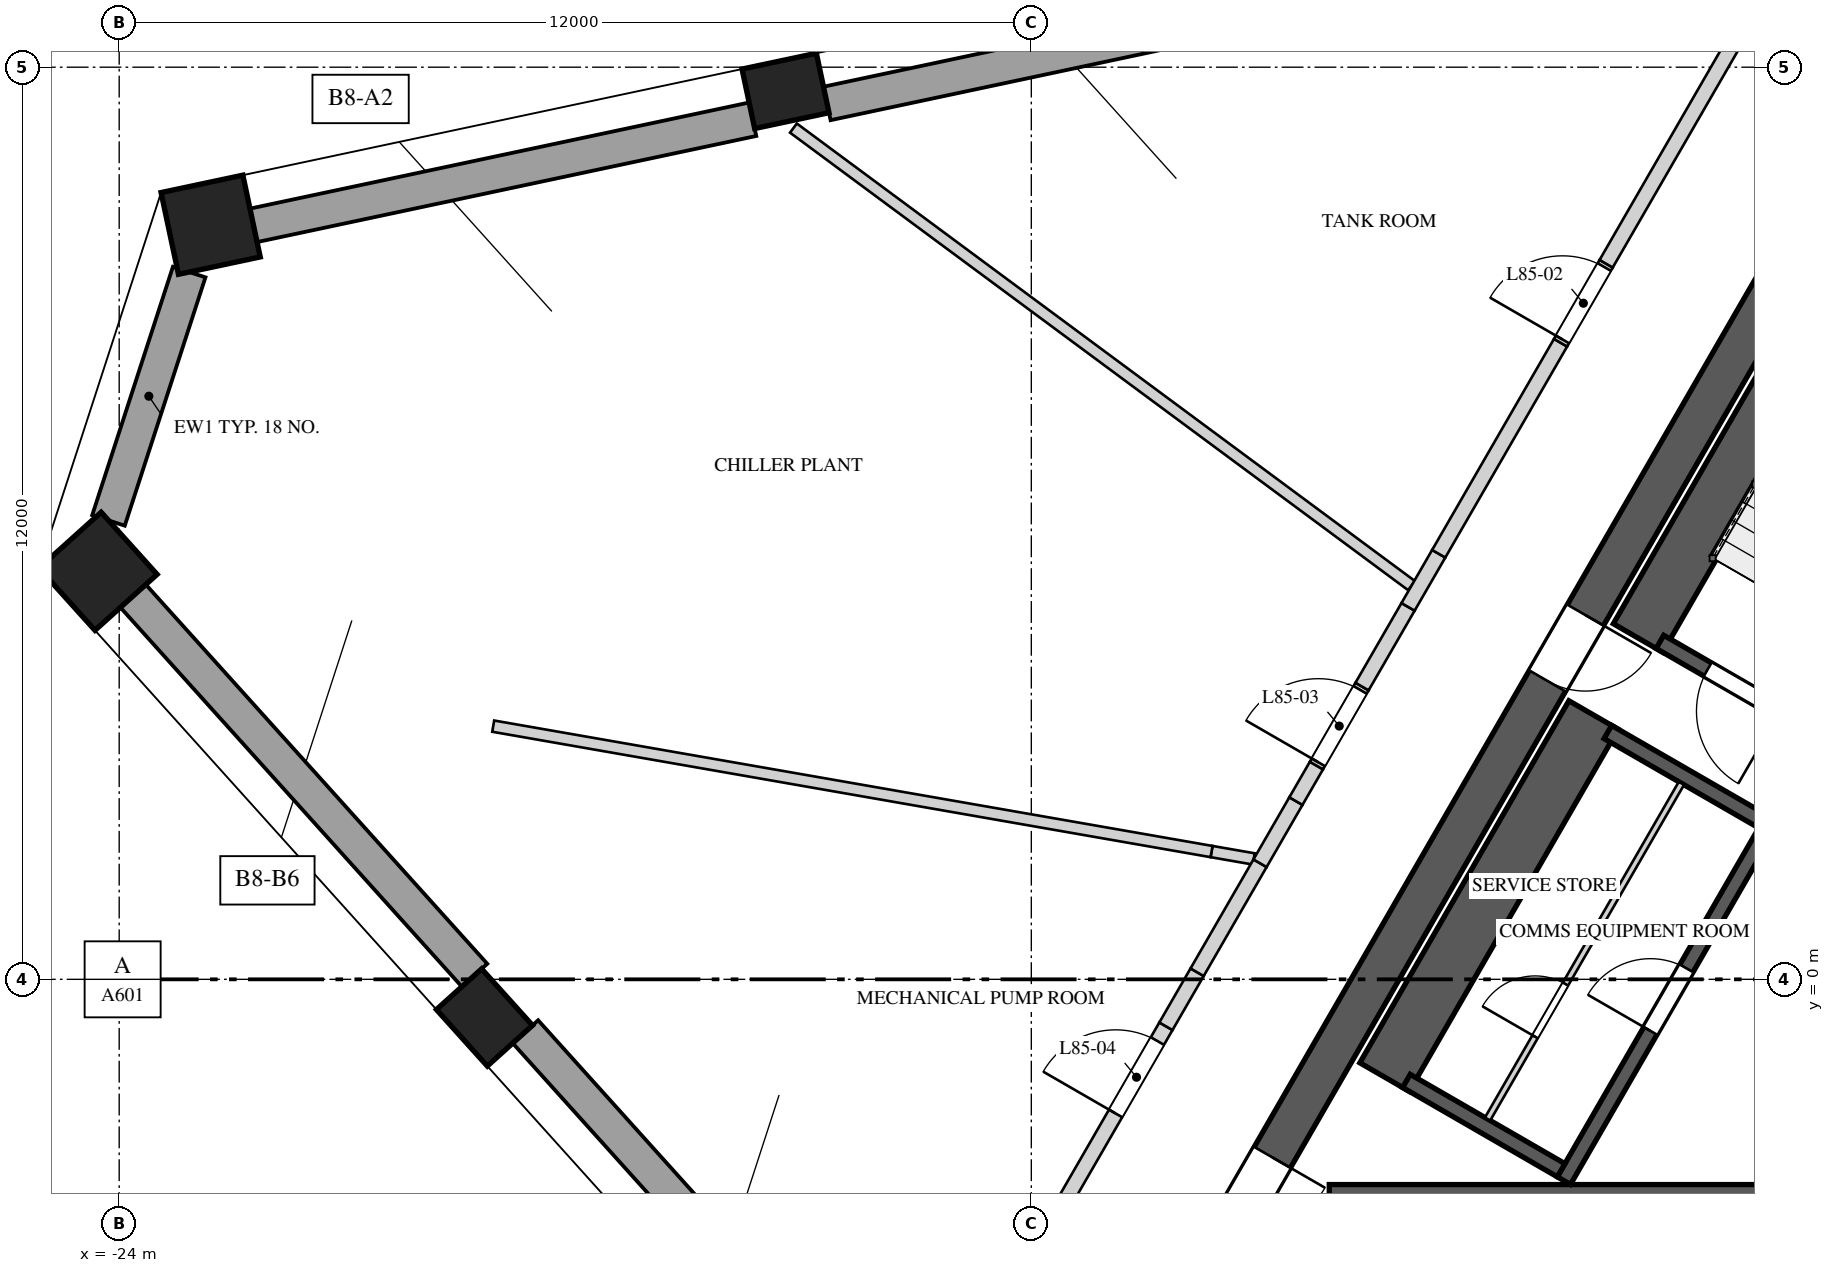
"""IFC4 building model, lengths in metres.
Left out: names, types, materials, properties, quantities, classifications, styles, units other than length and angle.
Written with IfcOpenShell. Run it as: python <this file> out.ifc"""

import sys

from ifc_helpers import new_model, si_unit, direction, frame, frame_2d, origin, origin_2d, place, context, subcontext, project, spatial, polyline, rectangle, outline, extrude, element, fill, save


model = new_model("IFC4")
c1 = context("Model", 3, precision=1e-05, world=origin(), true_north=direction((0.0, 1.0)))
c2 = subcontext(c1, "Body", "Model", "MODEL_VIEW")
j1 = project(units=[si_unit("LENGTHUNIT", "METRE"), si_unit("PLANEANGLEUNIT", "RADIAN")], contexts=[c1])
p1 = place(None, origin())
s1 = spatial("IfcSite", under=j1, at=p1, CompositionType="ELEMENT")
p2 = place(p1, origin())
s2 = spatial("IfcBuilding", under=s1, at=p2, CompositionType="ELEMENT")
p3 = place(p2, frame((0.0, 0.0, 370.4)))
s3 = spatial("IfcBuildingStorey", under=s2, at=p3, CompositionType="ELEMENT", Elevation=370.4)
p4 = place(p3, frame((-1.285, 10.725, 0.0), z_axis=(0.0, 0.0, 1.0), x_axis=(-0.499994590896, -0.86602852671, 0.0)))
e1 = element("IfcWall", 1, at=p4, inside=s3, PredefinedType="SHEAR", context=c2, shape_type="SweptSolid", body=[
    extrude(rectangle(XDim=17.292, YDim=0.55, at=frame_2d((8.646, 0.0))), origin(), (0.0, 0.0, 1.0), 4.5),
])
p5 = place(p4, frame((6.851, 0.0, 0.0)))
e2 = element("IfcOpeningElement", 2, at=p5, cuts=e1, PredefinedType="OPENING", context=c2, shape_type="SweptSolid", body=[
    extrude(rectangle(XDim=1.0, YDim=2.4, at=frame_2d((0.5, 1.2))), frame((0.0, 0.285, 0.0), z_axis=(0.0, -1.0, 0.0), x_axis=(1.0, 0.0, 0.0)), (0.0, 0.0, 1.0), 0.57),
])
p6 = place(p4, frame((15.089, 0.0, 0.0)))
e3 = element("IfcOpeningElement", 3, at=p6, cuts=e1, PredefinedType="OPENING", context=c2, shape_type="SweptSolid", body=[
    extrude(rectangle(XDim=0.8, YDim=2.1, at=frame_2d((0.4, 1.05))), frame((0.0, 0.285, 0.0), z_axis=(0.0, -1.0, 0.0), x_axis=(1.0, 0.0, 0.0)), (0.0, 0.0, 1.0), 0.57),
])
p7 = place(p3, frame((-24.278, 5.368, 0.0), z_axis=(0.0, 0.0, 1.0), x_axis=(0.669130606359, -0.743144825477, 0.0)))
e4 = element("IfcColumn", 4, at=p7, inside=s3, PredefinedType="COLUMN", context=c2, shape_type="SweptSolid", body=[
    extrude(rectangle(XDim=1.1, YDim=1.1, at=origin_2d()), origin(), (0.0, 0.0, 1.0), 4.5),
])
for number, where, z_axis, x_axis in (
    (5, (-19.195, -0.502, 0.0), (0.0, 0.0, 1.0), (0.669, -0.743, 0.0)),
    (6, (-15.234, 11.688, 0.0), (0.0, 0.0, 1.0), (-0.978, -0.208, 0.0)),
):
    element("IfcColumn", number, at=place(p3, frame(where, z_axis=z_axis, x_axis=x_axis)), inside=s3, PredefinedType="COLUMN", context=c2, shape_type="SweptSolid", body=[
        extrude(rectangle(XDim=1.0, YDim=0.8, at=origin_2d()), origin(), (0.0, 0.0, 1.0), 4.5),
    ])
p8 = place(p3, frame((-22.797, 9.927, 0.0), z_axis=(0.0, 0.0, 1.0), x_axis=(-0.978147600734, -0.207911690818, 0.0)))
e7 = element("IfcColumn", 7, at=p8, inside=s3, PredefinedType="COLUMN", context=c2, shape_type="SweptSolid", body=[
    extrude(rectangle(XDim=1.1, YDim=1.1, at=origin_2d()), origin(), (0.0, 0.0, 1.0), 4.5),
])
p9 = place(p3, frame((-23.079, 9.305, 0.0), z_axis=(0.0, 0.0, 1.0), x_axis=(-0.309076430482, -0.95103720228, 0.0)))
e8 = element("IfcWall", 8, at=p9, inside=s3, PredefinedType="SOLIDWALL", context=c2, shape_type="SweptSolid", body=[
    extrude(rectangle(XDim=3.435, YDim=0.45, at=frame_2d((1.718, 0.0))), origin(), (0.0, 0.0, 1.0), 3.8),
])
p10 = place(p3, frame((-23.817, 5.043, 0.0), z_axis=(0.0, 0.0, 1.0), x_axis=(0.669137493687, -0.743138624041, 0.0)))
e9 = element("IfcWall", 9, at=p10, inside=s3, PredefinedType="SOLIDWALL", context=c2, shape_type="SweptSolid", body=[
    extrude(rectangle(XDim=6.714, YDim=0.45, at=frame_2d((3.357, 0.0))), origin(), (0.0, 0.0, 1.0), 3.8),
])
p11 = place(p3, frame((-18.656, -0.689, 0.0), z_axis=(0.0, 0.0, 1.0), x_axis=(0.669117789535, -0.743156365598, 0.0)))
e10 = element("IfcWall", 10, at=p11, inside=s3, PredefinedType="SOLIDWALL", context=c2, shape_type="SweptSolid", body=[
    extrude(rectangle(XDim=7.314, YDim=0.45, at=frame_2d((3.657, 0.0))), origin(), (0.0, 0.0, 1.0), 3.8),
])
p12 = place(p3, frame((-15.666, 11.315, 0.0), z_axis=(0.0, 0.0, 1.0), x_axis=(-0.978144338977, -0.207927035587, 0.0)))
e11 = element("IfcWall", 11, at=p12, inside=s3, PredefinedType="SOLIDWALL", context=c2, shape_type="SweptSolid", body=[
    extrude(rectangle(XDim=6.714, YDim=0.45, at=frame_2d((3.357, 0.0))), origin(), (0.0, 0.0, 1.0), 3.8),
])
p13 = place(p3, frame((-7.533, 13.044, 0.0), z_axis=(0.0, 0.0, 1.0), x_axis=(-0.978151299843, -0.207894287118, 0.0)))
e12 = element("IfcWall", 12, at=p13, inside=s3, PredefinedType="SOLIDWALL", context=c2, shape_type="SweptSolid", body=[
    extrude(rectangle(XDim=7.314, YDim=0.45, at=frame_2d((3.657, 0.0))), origin(), (0.0, 0.0, 1.0), 3.8),
])
p14 = place(p3, frame((-0.918, 9.86, 0.0), z_axis=(0.0, 0.0, 1.0), x_axis=(-0.500026960575, -0.86600983753, 0.0)))
e13 = element("IfcWall", 13, at=p14, inside=s3, PredefinedType="SOLIDWALL", context=c2, shape_type="SweptSolid", body=[
    extrude(rectangle(XDim=6.2, YDim=0.75, at=frame_2d((3.1, 0.0))), origin(), (0.0, 0.0, 1.0), 4.15),
])
p15 = place(p3, frame((-1.521, 3.165, 0.0), z_axis=(0.0, 0.0, 1.0), x_axis=(-0.866030925526, 0.499990435942, 0.0)))
e14 = element("IfcWall", 14, at=p15, inside=s3, PredefinedType="SOLIDWALL", context=c2, shape_type="SweptSolid", body=[
    extrude(rectangle(XDim=2.55, YDim=0.2, at=frame_2d((1.275, 0.0))), origin(), (0.0, 0.0, 1.0), 4.15),
])
p16 = place(p15, frame((0.725, 0.0, 0.0)))
e15 = element("IfcOpeningElement", 15, at=p16, cuts=e14, PredefinedType="OPENING", context=c2, shape_type="SweptSolid", body=[
    extrude(rectangle(XDim=1.1, YDim=2.4, at=frame_2d((0.55, 1.2))), frame((0.0, 0.11, 0.0), z_axis=(0.0, -1.0, 0.0), x_axis=(1.0, 0.0, 0.0)), (0.0, 0.0, 1.0), 0.22),
])
p17 = place(p3, frame((-8.08, -2.8, 0.0), z_axis=(0.0, 0.0, 1.0), x_axis=(1.0, 0.0, 0.0)))
e16 = element("IfcWall", 16, at=p17, inside=s3, PredefinedType="SOLIDWALL", context=c2, shape_type="SweptSolid", body=[
    extrude(rectangle(XDim=6.2, YDim=0.2, at=frame_2d((3.1, 0.0))), origin(), (0.0, 0.0, 1.0), 4.15),
])
p18 = place(p3, frame((-4.993, -2.648, 0.0), z_axis=(0.0, 0.0, 1.0), x_axis=(0.499996545922, 0.866027397988, 0.0)))
e17 = element("IfcWall", 17, at=p18, inside=s3, PredefinedType="SOLIDWALL", context=c2, shape_type="SweptSolid", body=[
    extrude(rectangle(XDim=5.5, YDim=0.2, at=frame_2d((2.75, 0.0))), origin(), (0.0, 0.0, 1.0), 4.15),
])
p19 = place(p18, frame((2.275, 0.0, 0.0)))
e18 = element("IfcOpeningElement", 18, at=p19, cuts=e17, PredefinedType="OPENING", context=c2, shape_type="SweptSolid", body=[
    extrude(rectangle(XDim=0.95, YDim=2.4, at=frame_2d((0.475, 1.2))), frame((0.0, 0.11, 0.0), z_axis=(0.0, -1.0, 0.0), x_axis=(1.0, 0.0, 0.0)), (0.0, 0.0, 1.0), 0.22),
])
p20 = place(p3, frame((-4.603, 3.477, 0.0), z_axis=(0.0, 0.0, 1.0), x_axis=(-0.500015767406, -0.866016300277, 0.0)))
e19 = element("IfcWall", 19, at=p20, inside=s3, PredefinedType="SOLIDWALL", context=c2, shape_type="SweptSolid", body=[
    extrude(rectangle(XDim=5.5, YDim=0.75, at=frame_2d((2.75, 0.0))), origin(), (0.0, 0.0, 1.0), 4.15),
])
p21 = place(p3, frame((-2.38, 2.078, 0.0), z_axis=(0.0, 0.0, 1.0), x_axis=(-0.866061024631, 0.499938297808, 0.0)))
e20 = element("IfcWall", 20, at=p21, inside=s3, PredefinedType="SOLIDWALL", context=c2, shape_type="SweptSolid", body=[
    extrude(rectangle(XDim=2.35, YDim=0.2, at=frame_2d((1.175, 0.0))), origin(), (0.0, 0.0, 1.0), 4.15),
])
p22 = place(p3, frame((-5.03, -2.512, 0.0), z_axis=(0.0, 0.0, 1.0), x_axis=(-0.866016039709, 0.500016218704, 0.0)))
e21 = element("IfcWall", 21, at=p22, inside=s3, PredefinedType="SOLIDWALL", context=c2, shape_type="SweptSolid", body=[
    extrude(rectangle(XDim=2.35, YDim=0.2, at=frame_2d((1.175, 0.0))), origin(), (0.0, 0.0, 1.0), 4.15),
])
p23 = place(p3, frame((-5.997, -1.838, 0.0), z_axis=(0.0, 0.0, 1.0), x_axis=(0.500005610874, 0.86602216432, 0.0)))
e22 = element("IfcWall", 22, at=p23, inside=s3, PredefinedType="PARTITIONING", context=c2, shape_type="SweptSolid", body=[
    extrude(rectangle(XDim=5.1, YDim=0.08, at=frame_2d((2.55, 0.0))), origin(), (0.0, 0.0, 1.0), 4.15),
])
p24 = place(p23, frame((1.25, 0.0, 0.0)))
e23 = element("IfcOpeningElement", 23, at=p24, cuts=e22, PredefinedType="OPENING", context=c2, shape_type="SweptSolid", body=[
    extrude(rectangle(XDim=0.8, YDim=2.1, at=frame_2d((0.4, 1.05))), frame((0.0, 0.05, 0.0), z_axis=(0.0, -1.0, 0.0), x_axis=(1.0, 0.0, 0.0)), (0.0, 0.0, 1.0), 0.1),
])
p25 = place(p3, frame((-9.074, 1.584, 0.0), z_axis=(0.0, 0.0, 1.0), x_axis=(-0.985074607055, 0.172127913293, 0.0)))
e24 = element("IfcWall", 24, at=p25, inside=s3, PredefinedType="PARTITIONING", context=c2, shape_type="SweptSolid", body=[
    extrude(rectangle(XDim=0.563, YDim=0.15, at=frame_2d((0.281, 0.0))), origin(), (0.0, 0.0, 1.0), 3.05),
])
p26 = place(p3, frame((-9.628, 1.681, 0.0), z_axis=(0.0, 0.0, 1.0), x_axis=(-0.985101356033, 0.171974760768, 0.0)))
e25 = element("IfcWall", 25, at=p26, inside=s3, PredefinedType="PARTITIONING", context=c2, shape_type="SweptSolid", body=[
    extrude(rectangle(XDim=9.594, YDim=0.15, at=frame_2d((4.797, 0.0))), origin(), (0.0, 0.0, 1.0), 4.15),
])
p27 = place(p3, frame((-6.998, 5.18, 0.0), z_axis=(0.0, 0.0, 1.0), x_axis=(-0.803760198744, 0.594953395582, 0.0)))
e26 = element("IfcWall", 26, at=p27, inside=s3, PredefinedType="PARTITIONING", context=c2, shape_type="SweptSolid", body=[
    extrude(rectangle(XDim=10.117, YDim=0.15, at=frame_2d((5.059, 0.0))), origin(), (0.0, 0.0, 1.0), 3.25),
])
p28 = place(p3, frame((-12.326, -4.25, 0.0), z_axis=(0.0, 0.0, 1.0), x_axis=(0.499982771656, 0.866035350345, 0.0)))
e27 = element("IfcWall", 27, at=p28, inside=s3, PredefinedType="SOLIDWALL", context=c2, shape_type="SweptSolid", body=[
    extrude(rectangle(XDim=4.195, YDim=0.2, at=frame_2d((2.097, 0.0))), origin(), (0.0, 0.0, 1.0), 4.15),
])
p29 = place(p28, frame((2.87, 0.0, 0.0)))
e28 = element("IfcOpeningElement", 28, at=p29, cuts=e27, PredefinedType="OPENING", context=c2, shape_type="SweptSolid", body=[
    extrude(rectangle(XDim=1.1, YDim=2.4, at=frame_2d((0.55, 1.2))), frame((0.0, 0.11, 0.0), z_axis=(0.0, -1.0, 0.0), x_axis=(1.0, 0.0, 0.0)), (0.0, 0.0, 1.0), 0.22),
])
p30 = place(p3, frame((-10.229, -0.617, 0.0), z_axis=(0.0, 0.0, 1.0), x_axis=(0.5001686003, 0.865928040471, 0.0)))
e29 = element("IfcWall", 29, at=p30, inside=s3, PredefinedType="SOLIDWALL", context=c2, shape_type="SweptSolid", body=[
    extrude(rectangle(XDim=0.821, YDim=0.2, at=frame_2d((0.411, 0.0))), origin(), (0.0, 0.0, 1.0), 3.45),
])
p31 = place(p3, frame((-9.819, 0.094, 0.0), z_axis=(0.0, 0.0, 1.0), x_axis=(0.49997779057, 0.866038226025, 0.0)))
e30 = element("IfcWall", 30, at=p31, inside=s3, PredefinedType="SOLIDWALL", context=c2, shape_type="SweptSolid", body=[
    extrude(rectangle(XDim=1.655, YDim=0.2, at=frame_2d((0.828, 0.0))), origin(), (0.0, 0.0, 1.0), 4.15),
])
p32 = place(p3, frame((-8.991, 1.527, 0.0), z_axis=(0.0, 0.0, 1.0), x_axis=(0.500006071987, 0.866021898093, 0.0)))
e31 = element("IfcWall", 31, at=p32, inside=s3, PredefinedType="SOLIDWALL", context=c2, shape_type="SweptSolid", body=[
    extrude(rectangle(XDim=0.944, YDim=0.2, at=frame_2d((0.472, 0.0))), origin(), (0.0, 0.0, 1.0), 3.05),
])
p33 = place(p3, frame((-8.519, 2.344, 0.0), z_axis=(0.0, 0.0, 1.0), x_axis=(0.499931139538, 0.866065156741, 0.0)))
e32 = element("IfcWall", 32, at=p33, inside=s3, PredefinedType="SOLIDWALL", context=c2, shape_type="SweptSolid", body=[
    extrude(rectangle(XDim=0.54, YDim=0.2, at=frame_2d((0.27, 0.0))), origin(), (0.0, 0.0, 1.0), 4.15),
])
p34 = place(p3, frame((-8.249, 2.812, 0.0), z_axis=(0.0, 0.0, 1.0), x_axis=(0.500033551112, 0.866006032174, 0.0)))
e33 = element("IfcWall", 33, at=p34, inside=s3, PredefinedType="SOLIDWALL", context=c2, shape_type="SweptSolid", body=[
    extrude(outline(polyline([(0.0, 0.0), (1.2, 0.0), (1.2, 3.05), (0.267, 3.05), (0.267, 4.15), (0.0, 4.15), (0.0, 0.0)])), frame((0.0, 0.1, 0.0), z_axis=(0.0, -1.0, 0.0), x_axis=(1.0, 0.0, 0.0)), (0.0, 0.0, 1.0), 0.2),
])
p35 = place(p34, frame((0.05, 0.0, 0.0)))
e34 = element("IfcOpeningElement", 34, at=p35, cuts=e33, PredefinedType="OPENING", context=c2, shape_type="SweptSolid", body=[
    extrude(rectangle(XDim=1.1, YDim=2.4, at=frame_2d((0.55, 1.2))), frame((0.0, 0.11, 0.0), z_axis=(0.0, -1.0, 0.0), x_axis=(1.0, 0.0, 0.0)), (0.0, 0.0, 1.0), 0.22),
])
p36 = place(p3, frame((-7.649, 3.852, 0.0), z_axis=(0.0, 0.0, 1.0), x_axis=(0.49989119468, 0.866088213453, 0.0)))
e35 = element("IfcWall", 35, at=p36, inside=s3, PredefinedType="SOLIDWALL", context=c2, shape_type="SweptSolid", body=[
    extrude(rectangle(XDim=1.211, YDim=0.2, at=frame_2d((0.605, 0.0))), origin(), (0.0, 0.0, 1.0), 4.15),
])
p37 = place(p3, frame((-7.044, 4.9, 0.0), z_axis=(0.0, 0.0, 1.0), x_axis=(0.500141487433, 0.865943700565, 0.0)))
e36 = element("IfcWall", 36, at=p37, inside=s3, PredefinedType="SOLIDWALL", context=c2, shape_type="SweptSolid", body=[
    extrude(rectangle(XDim=0.807, YDim=0.2, at=frame_2d((0.403, 0.0))), origin(), (0.0, 0.0, 1.0), 3.25),
])
p38 = place(p3, frame((-6.64, 5.599, 0.0), z_axis=(0.0, 0.0, 1.0), x_axis=(0.49996417229, 0.866046087934, 0.0)))
e37 = element("IfcWall", 37, at=p38, inside=s3, PredefinedType="SOLIDWALL", context=c2, shape_type="SweptSolid", body=[
    extrude(rectangle(XDim=3.206, YDim=0.2, at=frame_2d((1.603, 0.0))), origin(), (0.0, 0.0, 1.0), 4.15),
])
p39 = place(p3, frame((-5.037, 8.375, 0.0), z_axis=(0.0, 0.0, 1.0), x_axis=(0.50012165622, 0.865955154139, 0.0)))
e38 = element("IfcWall", 38, at=p39, inside=s3, PredefinedType="SOLIDWALL", context=c2, shape_type="SweptSolid", body=[
    extrude(outline(polyline([(0.0, 0.0), (1.2, 0.0), (1.2, 4.15), (1.044, 4.15), (1.044, 3.45), (0.217, 3.45), (0.217, 4.15), (0.0, 4.15), (0.0, 0.0)])), frame((0.0, 0.1, 0.0), z_axis=(0.0, -1.0, 0.0), x_axis=(1.0, 0.0, 0.0)), (0.0, 0.0, 1.0), 0.2),
])
p40 = place(p39, frame((0.05, 0.0, 0.0)))
e39 = element("IfcOpeningElement", 39, at=p40, cuts=e38, PredefinedType="OPENING", context=c2, shape_type="SweptSolid", body=[
    extrude(rectangle(XDim=1.1, YDim=2.4, at=frame_2d((0.55, 1.2))), frame((0.0, 0.11, 0.0), z_axis=(0.0, -1.0, 0.0), x_axis=(1.0, 0.0, 0.0)), (0.0, 0.0, 1.0), 0.22),
])
p41 = place(p3, frame((-4.437, 9.414, 0.0), z_axis=(0.0, 0.0, 1.0), x_axis=(0.499967516757, 0.866044157181, 0.0)))
e40 = element("IfcWall", 40, at=p41, inside=s3, PredefinedType="SOLIDWALL", context=c2, shape_type="SweptSolid", body=[
    extrude(rectangle(XDim=3.909, YDim=0.2, at=frame_2d((1.955, 0.0))), origin(), (0.0, 0.0, 1.0), 4.15),
])
p42 = place(p16, origin())
e41 = element("IfcDoor", 41, at=p42, inside=s3, OperationType="SINGLE_SWING_RIGHT", PredefinedType="DOOR", context=c2, shape_type="SweptSolid", body=[
    extrude(rectangle(XDim=1.1, YDim=2.4, at=frame_2d((0.55, 1.2))), frame((0.0, 0.025, 0.0), z_axis=(0.0, -1.0, 0.0), x_axis=(1.0, 0.0, 0.0)), (0.0, 0.0, 1.0), 0.05),
])
fill(e15, e41)
p43 = place(p19, origin())
e42 = element("IfcDoor", 42, at=p43, inside=s3, OperationType="SINGLE_SWING_LEFT", PredefinedType="DOOR", context=c2, shape_type="SweptSolid", body=[
    extrude(rectangle(XDim=0.95, YDim=2.4, at=frame_2d((0.475, 1.2))), frame((0.0, 0.025, 0.0), z_axis=(0.0, -1.0, 0.0), x_axis=(1.0, 0.0, 0.0)), (0.0, 0.0, 1.0), 0.05),
])
fill(e18, e42)
p44 = place(p24, origin())
e43 = element("IfcDoor", 43, at=p44, inside=s3, OperationType="SINGLE_SWING_RIGHT", PredefinedType="DOOR", context=c2, shape_type="SweptSolid", body=[
    extrude(rectangle(XDim=0.8, YDim=2.1, at=frame_2d((0.4, 1.05))), frame((0.0, 0.025, 0.0), z_axis=(0.0, -1.0, 0.0), x_axis=(1.0, 0.0, 0.0)), (0.0, 0.0, 1.0), 0.05),
])
fill(e23, e43)
p45 = place(p5, origin())
e44 = element("IfcDoor", 44, at=p45, inside=s3, OperationType="SINGLE_SWING_RIGHT", PredefinedType="DOOR", context=c2, shape_type="SweptSolid", body=[
    extrude(rectangle(XDim=1.0, YDim=2.4, at=frame_2d((0.5, 1.2))), frame((0.0, 0.025, 0.0), z_axis=(0.0, -1.0, 0.0), x_axis=(1.0, 0.0, 0.0)), (0.0, 0.0, 1.0), 0.05),
])
fill(e2, e44)
p46 = place(p6, origin())
e45 = element("IfcDoor", 45, at=p46, inside=s3, OperationType="SINGLE_SWING_LEFT", PredefinedType="DOOR", context=c2, shape_type="SweptSolid", body=[
    extrude(rectangle(XDim=0.8, YDim=2.1, at=frame_2d((0.4, 1.05))), frame((0.0, 0.025, 0.0), z_axis=(0.0, -1.0, 0.0), x_axis=(1.0, 0.0, 0.0)), (0.0, 0.0, 1.0), 0.05),
])
fill(e3, e45)
p47 = place(p40, origin())
e46 = element("IfcDoor", 46, at=p47, inside=s3, OperationType="SINGLE_SWING_RIGHT", PredefinedType="DOOR", context=c2, shape_type="SweptSolid", body=[
    extrude(rectangle(XDim=1.1, YDim=2.4, at=frame_2d((0.55, 1.2))), frame((0.0, 0.025, 0.0), z_axis=(0.0, -1.0, 0.0), x_axis=(1.0, 0.0, 0.0)), (0.0, 0.0, 1.0), 0.05),
])
fill(e39, e46)
p48 = place(p35, origin())
e47 = element("IfcDoor", 47, at=p48, inside=s3, OperationType="SINGLE_SWING_LEFT", PredefinedType="DOOR", context=c2, shape_type="SweptSolid", body=[
    extrude(rectangle(XDim=1.1, YDim=2.4, at=frame_2d((0.55, 1.2))), frame((0.0, 0.025, 0.0), z_axis=(0.0, -1.0, 0.0), x_axis=(1.0, 0.0, 0.0)), (0.0, 0.0, 1.0), 0.05),
])
fill(e34, e47)
p49 = place(p29, origin())
e48 = element("IfcDoor", 48, at=p49, inside=s3, OperationType="SINGLE_SWING_RIGHT", PredefinedType="DOOR", context=c2, shape_type="SweptSolid", body=[
    extrude(rectangle(XDim=1.1, YDim=2.4, at=frame_2d((0.55, 1.2))), frame((0.0, 0.025, 0.0), z_axis=(0.0, -1.0, 0.0), x_axis=(1.0, 0.0, 0.0)), (0.0, 0.0, 1.0), 0.05),
])
fill(e28, e48)
save(model, sys.argv[1])
